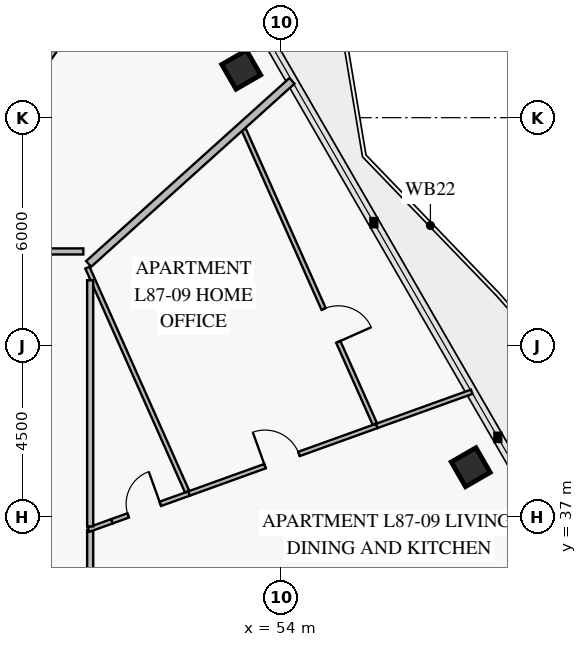
"""IFC4 building model, lengths in metres.
Left out: names, types, materials, properties, quantities, classifications, styles, units other than length and angle.
Written with IfcOpenShell. Run it as: python <this file> out.ifc"""

import sys

from ifc_helpers import new_model, si_unit, direction, frame, frame_2d, origin, origin_2d, place, context, subcontext, project, spatial, rectangle, extrude, element, fill, save


model = new_model("IFC4")
c1 = context("Model", 3, precision=1e-05, world=origin(), true_north=direction((0.0, 1.0)))
c2 = subcontext(c1, "Body", "Model", "MODEL_VIEW")
j1 = project(units=[si_unit("LENGTHUNIT", "METRE"), si_unit("PLANEANGLEUNIT", "RADIAN")], contexts=[c1])
p1 = place(None, origin())
s1 = spatial("IfcSite", under=j1, at=p1, CompositionType="ELEMENT")
p2 = place(p1, origin())
s2 = spatial("IfcBuilding", under=s1, at=p2, CompositionType="ELEMENT")
p3 = place(p2, frame((0.0, 0.0, 342.4)))
s3 = spatial("IfcBuildingStorey", under=s2, at=p3, CompositionType="ELEMENT", Elevation=342.4)
for number, where, z_axis, x_axis in (
    (1, (58.993, 38.302, 0.0), (0.0, 0.0, 1.0), (-0.5, 0.866, 0.0)),
    (2, (52.955, 48.762, 0.0), (0.0, 0.0, 1.0), (-0.5, 0.866, 0.0)),
):
    element("IfcColumn", number, at=place(p3, frame(where, z_axis=z_axis, x_axis=x_axis)), inside=s3, PredefinedType="COLUMN", context=c2, shape_type="SweptSolid", body=[
        extrude(rectangle(XDim=0.75, YDim=0.75, at=origin_2d()), origin(), (0.0, 0.0, 1.0), 3.55),
    ])
p4 = place(p3, frame((48.799, 43.98, 0.0), z_axis=(0.0, 0.0, 1.0), x_axis=(-1.0, 0.0, 0.0)))
e3 = element("IfcWall", 3, at=p4, inside=s3, PredefinedType="PARTITIONING", context=c2, shape_type="SweptSolid", body=[
    extrude(rectangle(XDim=4.418, YDim=0.16, at=frame_2d((2.209, 0.0))), origin(), (0.0, 0.0, 1.0), 3.0),
])
p5 = place(p4, frame((1.684, 0.0, 0.0)))
e4 = element("IfcOpeningElement", 4, at=p5, cuts=e3, PredefinedType="OPENING", context=c2, shape_type="SweptSolid", body=[
    extrude(rectangle(XDim=1.05, YDim=2.15, at=frame_2d((0.525, 1.075))), frame((0.0, 0.092, 0.0), z_axis=(0.0, -1.0, 0.0), x_axis=(1.0, 0.0, 0.0)), (0.0, 0.0, 1.0), 0.184),
])
p6 = place(p3, frame((49.55, 36.878, 0.0), z_axis=(0.0, 0.0, 1.0), x_axis=(0.940904714612, 0.338671401244, 0.0)))
e5 = element("IfcWall", 5, at=p6, inside=s3, PredefinedType="PARTITIONING", context=c2, shape_type="SweptSolid", body=[
    extrude(rectangle(XDim=2.158, YDim=0.12, at=frame_2d((1.079, 0.0))), origin(), (0.0, 0.0, 1.0), 3.55),
])
p7 = place(p6, frame((0.457, 0.0, 0.0)))
e6 = element("IfcOpeningElement", 6, at=p7, cuts=e5, PredefinedType="OPENING", context=c2, shape_type="SweptSolid", body=[
    extrude(rectangle(XDim=0.9, YDim=2.1, at=frame_2d((0.45, 1.05))), frame((0.0, 0.072, 0.0), z_axis=(0.0, -1.0, 0.0), x_axis=(1.0, 0.0, 0.0)), (0.0, 0.0, 1.0), 0.144),
])
p8 = place(p3, frame((51.581, 37.609, 0.0), z_axis=(0.0, 0.0, 1.0), x_axis=(0.940870812365, 0.338765574461, 0.0)))
e7 = element("IfcWall", 7, at=p8, inside=s3, PredefinedType="PARTITIONING", context=c2, shape_type="SweptSolid", body=[
    extrude(rectangle(XDim=5.25, YDim=0.12, at=frame_2d((2.625, 0.0))), origin(), (0.0, 0.0, 1.0), 3.2),
])
p9 = place(p8, frame((2.125, 0.0, 0.0)))
e8 = element("IfcOpeningElement", 8, at=p9, cuts=e7, PredefinedType="OPENING", context=c2, shape_type="SweptSolid", body=[
    extrude(rectangle(XDim=0.95, YDim=2.1, at=frame_2d((0.475, 1.05))), frame((0.0, 0.072, 0.0), z_axis=(0.0, -1.0, 0.0), x_axis=(1.0, 0.0, 0.0)), (0.0, 0.0, 1.0), 0.144),
])
p10 = place(p3, frame((56.469, 39.442, 0.0), z_axis=(0.0, 0.0, 1.0), x_axis=(-0.406736554193, 0.913545497216, 0.0)))
e9 = element("IfcWall", 9, at=p10, inside=s3, PredefinedType="PARTITIONING", context=c2, shape_type="SweptSolid", body=[
    extrude(rectangle(XDim=8.483, YDim=0.12, at=frame_2d((4.241, 0.0))), origin(), (0.0, 0.0, 1.0), 3.55),
])
p11 = place(p10, frame((2.362, 0.0, 0.0)))
e10 = element("IfcOpeningElement", 10, at=p11, cuts=e9, PredefinedType="OPENING", context=c2, shape_type="SweptSolid", body=[
    extrude(rectangle(XDim=0.95, YDim=2.1, at=frame_2d((0.475, 1.05))), frame((0.0, 0.072, 0.0), z_axis=(0.0, -1.0, 0.0), x_axis=(1.0, 0.0, 0.0)), (0.0, 0.0, 1.0), 0.144),
])
p12 = place(p3, frame((48.98, 33.499, 0.0), z_axis=(0.0, 0.0, 1.0), x_axis=(0.0, 1.0, 0.0)))
e11 = element("IfcWall", 11, at=p12, inside=s3, PredefinedType="PARTITIONING", context=c2, shape_type="SweptSolid", body=[
    extrude(rectangle(XDim=3.153, YDim=0.16, at=frame_2d((1.576, 0.0))), origin(), (0.0, 0.0, 1.0), 3.0),
])
p13 = place(p12, frame((1.052, 0.0, 0.0)))
e12 = element("IfcOpeningElement", 12, at=p13, cuts=e11, PredefinedType="OPENING", context=c2, shape_type="SweptSolid", body=[
    extrude(rectangle(XDim=1.05, YDim=2.15, at=frame_2d((0.525, 1.075))), frame((0.0, 0.092, 0.0), z_axis=(0.0, -1.0, 0.0), x_axis=(1.0, 0.0, 0.0)), (0.0, 0.0, 1.0), 0.184),
])
p14 = place(p3, frame((48.94, 43.651, 0.0), z_axis=(0.0, 0.0, 1.0), x_axis=(0.74315080538, 0.669123964944, 0.0)))
e13 = element("IfcWall", 13, at=p14, inside=s3, PredefinedType="PARTITIONING", context=c2, shape_type="SweptSolid", body=[
    extrude(rectangle(XDim=7.199, YDim=0.2, at=frame_2d((3.6, 0.0))), origin(), (0.0, 0.0, 1.0), 2.97),
])
p15 = place(p3, frame((43.774, 47.39, 0.0), z_axis=(0.0, 0.0, 1.0), x_axis=(0.450869548037, 0.892589855787, 0.0)))
e14 = element("IfcWall", 14, at=p15, inside=s3, PredefinedType="PARTITIONING", context=c2, shape_type="SweptSolid", body=[
    extrude(rectangle(XDim=9.74, YDim=0.12, at=frame_2d((4.87, 0.0))), origin(), (0.0, 0.0, 1.0), 2.97),
])
p16 = place(p3, frame((46.171, 46.579, 0.0), z_axis=(0.0, 0.0, 1.0), x_axis=(0.572144356321, 0.820152934233, 0.0)))
e15 = element("IfcWall", 15, at=p16, inside=s3, PredefinedType="PARTITIONING", context=c2, shape_type="SweptSolid", body=[
    extrude(rectangle(XDim=8.819, YDim=0.12, at=frame_2d((4.41, 0.0))), origin(), (0.0, 0.0, 1.0), 2.97),
])
p17 = place(p3, frame((48.937, 36.657, 0.0), z_axis=(0.0, 0.0, 1.0), x_axis=(0.940849224184, 0.338825526417, 0.0)))
e16 = element("IfcWall", 16, at=p17, inside=s3, PredefinedType="PARTITIONING", context=c2, shape_type="SweptSolid", body=[
    extrude(rectangle(XDim=0.652, YDim=0.12, at=frame_2d((0.326, 0.0))), origin(), (0.0, 0.0, 1.0), 3.55),
])
p18 = place(p3, frame((56.521, 39.388, 0.0), z_axis=(0.0, 0.0, 1.0), x_axis=(0.940883895468, 0.338729235894, 0.0)))
e17 = element("IfcWall", 17, at=p18, inside=s3, PredefinedType="PARTITIONING", context=c2, shape_type="SweptSolid", body=[
    extrude(rectangle(XDim=2.655, YDim=0.12, at=frame_2d((1.328, 0.0))), origin(), (0.0, 0.0, 1.0), 2.97),
])
p19 = place(p3, frame((51.53, 37.663, 0.0), z_axis=(0.0, 0.0, 1.0), x_axis=(-0.406732154443, 0.913547456097, 0.0)))
e18 = element("IfcWall", 18, at=p19, inside=s3, PredefinedType="PARTITIONING", context=c2, shape_type="SweptSolid", body=[
    extrude(rectangle(XDim=6.447, YDim=0.12, at=frame_2d((3.224, 0.0))), origin(), (0.0, 0.0, 1.0), 3.55),
])
p20 = place(p3, frame((48.98, 36.745, 0.0), z_axis=(0.0, 0.0, 1.0), x_axis=(0.0, 1.0, 0.0)))
e19 = element("IfcWall", 19, at=p20, inside=s3, PredefinedType="PARTITIONING", context=c2, shape_type="SweptSolid", body=[
    extrude(rectangle(XDim=6.477, YDim=0.16, at=frame_2d((3.238, 0.0))), origin(), (0.0, 0.0, 1.0), 3.55),
])
p21 = place(p7, origin())
e20 = element("IfcDoor", 20, at=p21, inside=s3, OperationType="SINGLE_SWING_RIGHT", PredefinedType="DOOR", context=c2, shape_type="SweptSolid", body=[
    extrude(rectangle(XDim=0.9, YDim=2.1, at=frame_2d((0.45, 1.05))), frame((0.0, 0.025, 0.0), z_axis=(0.0, -1.0, 0.0), x_axis=(1.0, 0.0, 0.0)), (0.0, 0.0, 1.0), 0.05),
])
fill(e6, e20)
p22 = place(p9, origin())
e21 = element("IfcDoor", 21, at=p22, inside=s3, OperationType="SINGLE_SWING_LEFT", PredefinedType="DOOR", context=c2, shape_type="SweptSolid", body=[
    extrude(rectangle(XDim=0.95, YDim=2.1, at=frame_2d((0.475, 1.05))), frame((0.0, 0.025, 0.0), z_axis=(0.0, -1.0, 0.0), x_axis=(1.0, 0.0, 0.0)), (0.0, 0.0, 1.0), 0.05),
])
fill(e8, e21)
p23 = place(p11, frame((0.95, 0.0, 0.0), z_axis=(0.0, 0.0, 1.0), x_axis=(-1.0, 0.0, 0.0)))
e22 = element("IfcDoor", 22, at=p23, inside=s3, OperationType="SINGLE_SWING_RIGHT", PredefinedType="DOOR", context=c2, shape_type="SweptSolid", body=[
    extrude(rectangle(XDim=0.95, YDim=2.1, at=frame_2d((0.475, 1.05))), frame((0.0, 0.025, 0.0), z_axis=(0.0, -1.0, 0.0), x_axis=(1.0, 0.0, 0.0)), (0.0, 0.0, 1.0), 0.05),
])
fill(e10, e22)
save(model, sys.argv[1])
